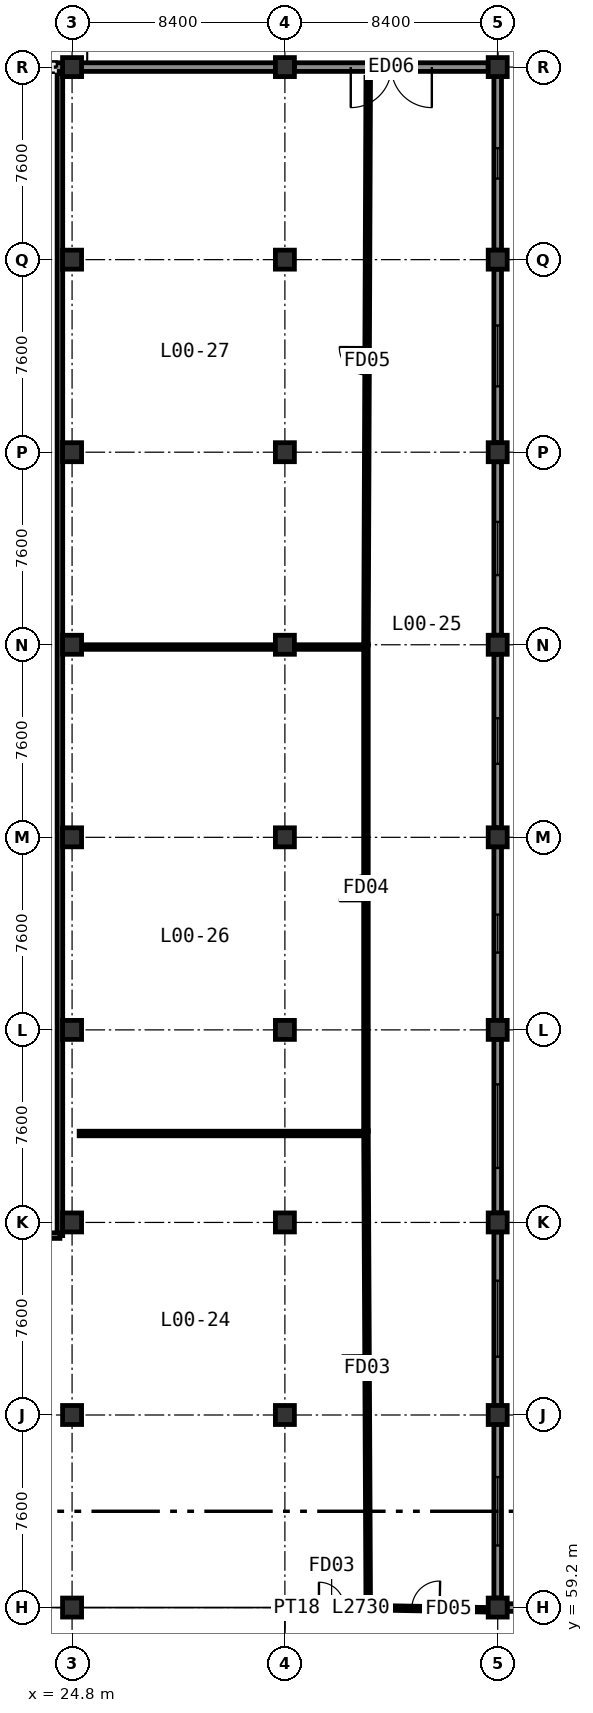
"""IFC4 building model, lengths in metres.
Left out: names, types, materials, properties, quantities, classifications, styles, units other than length and angle.
Written with IfcOpenShell. Run it as: python <this file> out.ifc"""

import sys

from ifc_helpers import new_model, si_unit, direction, frame, frame_2d, origin, origin_2d, place, context, subcontext, project, spatial, rectangle, extrude, element, fill, save


model = new_model("IFC4")
c1 = context("Model", 3, precision=1e-05, world=origin(), true_north=direction((0.0, 1.0)))
c2 = subcontext(c1, "Body", "Model", "MODEL_VIEW")
j1 = project(units=[si_unit("LENGTHUNIT", "METRE"), si_unit("PLANEANGLEUNIT", "RADIAN")], contexts=[c1])
p1 = place(None, origin())
s1 = spatial("IfcSite", under=j1, at=p1, CompositionType="ELEMENT")
p2 = place(p1, origin())
s2 = spatial("IfcBuilding", under=s1, at=p2, CompositionType="ELEMENT")
p3 = place(p2, origin())
s3 = spatial("IfcBuildingStorey", under=s2, at=p3, CompositionType="ELEMENT", Elevation=0.0)
for number, where, z_axis, x_axis in (
    (1, (24.8, 59.2, 0.0), (0.0, 0.0, 1.0), (1.0, 0.0, 0.0)),
    (2, (33.2, 59.2, 0.0), (0.0, 0.0, 1.0), (1.0, 0.0, 0.0)),
    (3, (41.6, 59.2, 0.0), (0.0, 0.0, 1.0), (1.0, 0.0, 0.0)),
    (4, (24.8, 66.8, 0.0), (0.0, 0.0, 1.0), (1.0, 0.0, 0.0)),
    (5, (33.2, 66.8, 0.0), (0.0, 0.0, 1.0), (1.0, 0.0, 0.0)),
    (6, (41.6, 66.8, 0.0), (0.0, 0.0, 1.0), (1.0, 0.0, 0.0)),
    (7, (24.8, 74.4, 0.0), (0.0, 0.0, 1.0), (1.0, 0.0, 0.0)),
    (8, (33.2, 74.4, 0.0), (0.0, 0.0, 1.0), (1.0, 0.0, 0.0)),
    (9, (41.6, 74.4, 0.0), (0.0, 0.0, 1.0), (1.0, 0.0, 0.0)),
    (10, (24.8, 82.0, 0.0), (0.0, 0.0, 1.0), (1.0, 0.0, 0.0)),
    (11, (33.2, 82.0, 0.0), (0.0, 0.0, 1.0), (1.0, 0.0, 0.0)),
    (12, (41.6, 82.0, 0.0), (0.0, 0.0, 1.0), (1.0, 0.0, 0.0)),
    (13, (24.8, 89.6, 0.0), (0.0, 0.0, 1.0), (1.0, 0.0, 0.0)),
    (14, (33.2, 89.6, 0.0), (0.0, 0.0, 1.0), (1.0, 0.0, 0.0)),
    (15, (41.6, 89.6, 0.0), (0.0, 0.0, 1.0), (1.0, 0.0, 0.0)),
    (16, (24.8, 97.2, 0.0), (0.0, 0.0, 1.0), (1.0, 0.0, 0.0)),
    (17, (33.2, 97.2, 0.0), (0.0, 0.0, 1.0), (1.0, 0.0, 0.0)),
    (18, (41.6, 97.2, 0.0), (0.0, 0.0, 1.0), (1.0, 0.0, 0.0)),
    (19, (24.8, 104.8, 0.0), (0.0, 0.0, 1.0), (1.0, 0.0, 0.0)),
    (20, (33.2, 104.8, 0.0), (0.0, 0.0, 1.0), (1.0, 0.0, 0.0)),
    (21, (41.6, 104.8, 0.0), (0.0, 0.0, 1.0), (1.0, 0.0, 0.0)),
    (22, (24.8, 112.4, 0.0), (0.0, 0.0, 1.0), (1.0, 0.0, 0.0)),
    (23, (33.2, 112.4, 0.0), (0.0, 0.0, 1.0), (1.0, 0.0, 0.0)),
    (24, (41.6, 112.4, 0.0), (0.0, 0.0, 1.0), (1.0, 0.0, 0.0)),
    (25, (24.8, 120.0, 0.0), (0.0, 0.0, 1.0), (1.0, 0.0, 0.0)),
    (26, (33.2, 120.0, 0.0), (0.0, 0.0, 1.0), (1.0, 0.0, 0.0)),
    (27, (41.6, 120.0, 0.0), (0.0, 0.0, 1.0), (1.0, 0.0, 0.0)),
):
    element("IfcColumn", number, at=place(p3, frame(where, z_axis=z_axis, x_axis=x_axis)), inside=s3, PredefinedType="COLUMN", context=c2, shape_type="SweptSolid", body=[
        extrude(rectangle(XDim=0.75, YDim=0.75, at=origin_2d()), origin(), (0.0, 0.0, 1.0), 4.8),
    ])
p4 = place(p3, frame((49.625, 59.2, 0.0), z_axis=(0.0, 0.0, 1.0), x_axis=(-1.0, 0.0, 0.0)))
e28 = element("IfcWall", 28, at=p4, inside=s3, PredefinedType="SOLIDWALL", context=c2, shape_type="SweptSolid", body=[
    extrude(rectangle(XDim=7.65, YDim=0.3, at=frame_2d((3.825, 0.0))), origin(), (0.0, 0.0, 1.0), 4.5),
])
p5 = place(p4, frame((2.625, 0.0, 0.95)))
e29 = element("IfcOpeningElement", 29, at=p5, cuts=e28, PredefinedType="OPENING", context=c2, shape_type="SweptSolid", body=[
    extrude(rectangle(XDim=2.4, YDim=2.1, at=frame_2d((1.2, 1.05))), frame((0.0, 0.16, 0.0), z_axis=(0.0, -1.0, 0.0), x_axis=(1.0, 0.0, 0.0)), (0.0, 0.0, 1.0), 0.32),
])
p6 = place(p3, frame((41.6, 59.575, 0.0), z_axis=(0.0, 0.0, 1.0), x_axis=(0.0, 1.0, 0.0)))
e30 = element("IfcWall", 30, at=p6, inside=s3, PredefinedType="SOLIDWALL", context=c2, shape_type="SweptSolid", body=[
    extrude(rectangle(XDim=6.85, YDim=0.3, at=frame_2d((3.425, 0.0))), origin(), (0.0, 0.0, 1.0), 4.5),
])
p7 = place(p6, frame((2.075, 0.0, 0.95)))
e31 = element("IfcOpeningElement", 31, at=p7, cuts=e30, PredefinedType="OPENING", context=c2, shape_type="SweptSolid", body=[
    extrude(rectangle(XDim=2.7, YDim=2.1, at=frame_2d((1.35, 1.05))), frame((0.0, 0.16, 0.0), z_axis=(0.0, -1.0, 0.0), x_axis=(1.0, 0.0, 0.0)), (0.0, 0.0, 1.0), 0.32),
])
p8 = place(p3, frame((41.6, 67.175, 0.0), z_axis=(0.0, 0.0, 1.0), x_axis=(0.0, 1.0, 0.0)))
e32 = element("IfcWall", 32, at=p8, inside=s3, PredefinedType="SOLIDWALL", context=c2, shape_type="SweptSolid", body=[
    extrude(rectangle(XDim=6.85, YDim=0.3, at=frame_2d((3.425, 0.0))), origin(), (0.0, 0.0, 1.0), 4.5),
])
p9 = place(p8, frame((1.925, 0.0, 0.95)))
e33 = element("IfcOpeningElement", 33, at=p9, cuts=e32, PredefinedType="OPENING", context=c2, shape_type="SweptSolid", body=[
    extrude(rectangle(XDim=3.0, YDim=2.1, at=frame_2d((1.5, 1.05))), frame((0.0, 0.16, 0.0), z_axis=(0.0, -1.0, 0.0), x_axis=(1.0, 0.0, 0.0)), (0.0, 0.0, 1.0), 0.32),
])
p10 = place(p3, frame((41.6, 74.775, 0.0), z_axis=(0.0, 0.0, 1.0), x_axis=(0.0, 1.0, 0.0)))
e34 = element("IfcWall", 34, at=p10, inside=s3, PredefinedType="SOLIDWALL", context=c2, shape_type="SweptSolid", body=[
    extrude(rectangle(XDim=6.85, YDim=0.3, at=frame_2d((3.425, 0.0))), origin(), (0.0, 0.0, 1.0), 4.5),
])
p11 = place(p10, frame((1.775, 0.0, 0.95)))
e35 = element("IfcOpeningElement", 35, at=p11, cuts=e34, PredefinedType="OPENING", context=c2, shape_type="SweptSolid", body=[
    extrude(rectangle(XDim=3.3, YDim=2.1, at=frame_2d((1.65, 1.05))), frame((0.0, 0.16, 0.0), z_axis=(0.0, -1.0, 0.0), x_axis=(1.0, 0.0, 0.0)), (0.0, 0.0, 1.0), 0.32),
])
p12 = place(p3, frame((41.6, 82.375, 0.0), z_axis=(0.0, 0.0, 1.0), x_axis=(0.0, 1.0, 0.0)))
e36 = element("IfcWall", 36, at=p12, inside=s3, PredefinedType="SOLIDWALL", context=c2, shape_type="SweptSolid", body=[
    extrude(rectangle(XDim=6.85, YDim=0.3, at=frame_2d((3.425, 0.0))), origin(), (0.0, 0.0, 1.0), 4.5),
])
p13 = place(p12, frame((2.675, 0.0, 0.95)))
e37 = element("IfcOpeningElement", 37, at=p13, cuts=e36, PredefinedType="OPENING", context=c2, shape_type="SweptSolid", body=[
    extrude(rectangle(XDim=1.5, YDim=1.2, at=frame_2d((0.75, 0.6))), frame((0.0, 0.16, 0.0), z_axis=(0.0, -1.0, 0.0), x_axis=(1.0, 0.0, 0.0)), (0.0, 0.0, 1.0), 0.32),
])
p14 = place(p3, frame((41.6, 89.975, 0.0), z_axis=(0.0, 0.0, 1.0), x_axis=(0.0, 1.0, 0.0)))
e38 = element("IfcWall", 38, at=p14, inside=s3, PredefinedType="SOLIDWALL", context=c2, shape_type="SweptSolid", body=[
    extrude(rectangle(XDim=6.85, YDim=0.3, at=frame_2d((3.425, 0.0))), origin(), (0.0, 0.0, 1.0), 3.95),
])
p15 = place(p14, frame((2.525, 0.0, 0.95)))
e39 = element("IfcOpeningElement", 39, at=p15, cuts=e38, PredefinedType="OPENING", context=c2, shape_type="SweptSolid", body=[
    extrude(rectangle(XDim=1.8, YDim=1.2, at=frame_2d((0.9, 0.6))), frame((0.0, 0.16, 0.0), z_axis=(0.0, -1.0, 0.0), x_axis=(1.0, 0.0, 0.0)), (0.0, 0.0, 1.0), 0.32),
])
p16 = place(p3, frame((41.6, 97.575, 0.0), z_axis=(0.0, 0.0, 1.0), x_axis=(0.0, 1.0, 0.0)))
e40 = element("IfcWall", 40, at=p16, inside=s3, PredefinedType="SOLIDWALL", context=c2, shape_type="SweptSolid", body=[
    extrude(rectangle(XDim=6.85, YDim=0.3, at=frame_2d((3.425, 0.0))), origin(), (0.0, 0.0, 1.0), 3.95),
])
p17 = place(p16, frame((2.375, 0.0, 0.95)))
e41 = element("IfcOpeningElement", 41, at=p17, cuts=e40, PredefinedType="OPENING", context=c2, shape_type="SweptSolid", body=[
    extrude(rectangle(XDim=2.1, YDim=1.2, at=frame_2d((1.05, 0.6))), frame((0.0, 0.16, 0.0), z_axis=(0.0, -1.0, 0.0), x_axis=(1.0, 0.0, 0.0)), (0.0, 0.0, 1.0), 0.32),
])
p18 = place(p3, frame((41.6, 105.175, 0.0), z_axis=(0.0, 0.0, 1.0), x_axis=(0.0, 1.0, 0.0)))
e42 = element("IfcWall", 42, at=p18, inside=s3, PredefinedType="SOLIDWALL", context=c2, shape_type="SweptSolid", body=[
    extrude(rectangle(XDim=6.85, YDim=0.3, at=frame_2d((3.425, 0.0))), origin(), (0.0, 0.0, 1.0), 3.95),
])
p19 = place(p18, frame((2.225, 0.0, 0.95)))
e43 = element("IfcOpeningElement", 43, at=p19, cuts=e42, PredefinedType="OPENING", context=c2, shape_type="SweptSolid", body=[
    extrude(rectangle(XDim=2.4, YDim=1.2, at=frame_2d((1.2, 0.6))), frame((0.0, 0.16, 0.0), z_axis=(0.0, -1.0, 0.0), x_axis=(1.0, 0.0, 0.0)), (0.0, 0.0, 1.0), 0.32),
])
p20 = place(p3, frame((41.6, 112.775, 0.0), z_axis=(0.0, 0.0, 1.0), x_axis=(0.0, 1.0, 0.0)))
e44 = element("IfcWall", 44, at=p20, inside=s3, PredefinedType="SOLIDWALL", context=c2, shape_type="SweptSolid", body=[
    extrude(rectangle(XDim=6.85, YDim=0.3, at=frame_2d((3.425, 0.0))), origin(), (0.0, 0.0, 1.0), 3.95),
])
p21 = place(p20, frame((2.825, 0.0, 0.95)))
e45 = element("IfcOpeningElement", 45, at=p21, cuts=e44, PredefinedType="OPENING", context=c2, shape_type="SweptSolid", body=[
    extrude(rectangle(XDim=1.2, YDim=1.5, at=frame_2d((0.6, 0.75))), frame((0.0, 0.16, 0.0), z_axis=(0.0, -1.0, 0.0), x_axis=(1.0, 0.0, 0.0)), (0.0, 0.0, 1.0), 0.32),
])
p22 = place(p3, frame((41.225, 120.0, 0.0), z_axis=(0.0, 0.0, 1.0), x_axis=(-1.0, 0.0, 0.0)))
e46 = element("IfcWall", 46, at=p22, inside=s3, PredefinedType="SOLIDWALL", context=c2, shape_type="SweptSolid", body=[
    extrude(rectangle(XDim=7.65, YDim=0.34, at=frame_2d((3.825, 0.0))), origin(), (0.0, 0.0, 1.0), 4.187),
])
p23 = place(p22, frame((2.225, 0.0, 0.0)))
e47 = element("IfcOpeningElement", 47, at=p23, cuts=e46, PredefinedType="OPENING", context=c2, shape_type="SweptSolid", body=[
    extrude(rectangle(XDim=3.2, YDim=3.0, at=frame_2d((1.6, 1.5))), frame((0.0, 0.18, 0.0), z_axis=(0.0, -1.0, 0.0), x_axis=(1.0, 0.0, 0.0)), (0.0, 0.0, 1.0), 0.36),
])
p24 = place(p3, frame((16.775, 120.0, 0.0), z_axis=(0.0, 0.0, 1.0), x_axis=(1.0, 0.0, 0.0)))
e48 = element("IfcWall", 48, at=p24, inside=s3, PredefinedType="SOLIDWALL", context=c2, shape_type="SweptSolid", body=[
    extrude(rectangle(XDim=16.05, YDim=0.34, at=frame_2d((8.025, 0.0))), origin(), (0.0, 0.0, 1.0), 4.187),
])
p25 = place(p24, frame((0.825, 0.0, 0.0)))
e49 = element("IfcOpeningElement", 49, at=p25, cuts=e48, PredefinedType="OPENING", context=c2, shape_type="SweptSolid", body=[
    extrude(rectangle(XDim=6.6, YDim=3.0, at=frame_2d((3.3, 1.5))), frame((0.0, 0.18, 0.0), z_axis=(0.0, -1.0, 0.0), x_axis=(1.0, 0.0, 0.0)), (0.0, 0.0, 1.0), 0.36),
])
p26 = place(p3, frame((24.32, 73.88, 0.0), z_axis=(0.0, 0.0, 1.0), x_axis=(0.0, 1.0, 0.0)))
e50 = element("IfcWall", 50, at=p26, inside=s3, PredefinedType="SOLIDWALL", context=c2, shape_type="SweptSolid", body=[
    extrude(rectangle(XDim=45.87, YDim=0.22, at=frame_2d((22.935, 0.0))), origin(), (0.0, 0.0, 1.0), 4.5),
])
p27 = place(p3, frame((17.48, 73.88, 0.0), z_axis=(0.0, 0.0, 1.0), x_axis=(1.0, 0.0, 0.0)))
e51 = element("IfcWall", 51, at=p27, inside=s3, PredefinedType="SOLIDWALL", context=c2, shape_type="SweptSolid", body=[
    extrude(rectangle(XDim=6.84, YDim=0.22, at=frame_2d((3.42, 0.0))), origin(), (0.0, 0.0, 1.0), 4.5),
])
p28 = place(p3, frame((33.68, 59.2, 0.0), z_axis=(0.0, 0.0, 1.0), x_axis=(1.0, 0.0, 0.0)))
e52 = element("IfcWall", 52, at=p28, inside=s3, PredefinedType="PARTITIONING", context=c2, shape_type="SweptSolid", body=[
    extrude(rectangle(XDim=2.729, YDim=0.18, at=frame_2d((1.365, 0.0))), origin(), (0.0, 0.0, 1.0), 4.5),
])
p29 = place(p28, frame((0.865, 0.0, 0.0)))
e53 = element("IfcOpeningElement", 53, at=p29, cuts=e52, PredefinedType="OPENING", context=c2, shape_type="SweptSolid", body=[
    extrude(rectangle(XDim=1.0, YDim=2.1, at=frame_2d((0.5, 1.05))), frame((0.0, 0.1, 0.0), z_axis=(0.0, -1.0, 0.0), x_axis=(1.0, 0.0, 0.0)), (0.0, 0.0, 1.0), 0.2),
])
p30 = place(p3, frame((36.49, 59.29, 0.0), z_axis=(0.0, 0.0, 1.0), x_axis=(-0.004757754169, 0.999988681824, 0.0)))
e54 = element("IfcWall", 54, at=p30, inside=s3, PredefinedType="PARTITIONING", context=c2, shape_type="SweptSolid", body=[
    extrude(rectangle(XDim=18.73, YDim=0.18, at=frame_2d((9.365, 0.0))), origin(), (0.0, 0.0, 1.0), 4.5),
])
p31 = place(p30, frame((8.865, 0.0, 0.0)))
e55 = element("IfcOpeningElement", 55, at=p31, cuts=e54, PredefinedType="OPENING", context=c2, shape_type="SweptSolid", body=[
    extrude(rectangle(XDim=1.0, YDim=2.1, at=frame_2d((0.5, 1.05))), frame((0.0, 0.1, 0.0), z_axis=(0.0, -1.0, 0.0), x_axis=(1.0, 0.0, 0.0)), (0.0, 0.0, 1.0), 0.2),
])
p32 = place(p3, frame((36.4, 77.99, 0.0), z_axis=(0.0, 0.0, 1.0), x_axis=(0.0, 1.0, 0.0)))
e56 = element("IfcWall", 56, at=p32, inside=s3, PredefinedType="PARTITIONING", context=c2, shape_type="SweptSolid", body=[
    extrude(rectangle(XDim=19.229, YDim=0.18, at=frame_2d((9.615, 0.0))), origin(), (0.0, 0.0, 1.0), 4.5),
])
p33 = place(p32, frame((9.09, 0.0, 0.0)))
e57 = element("IfcOpeningElement", 57, at=p33, cuts=e56, PredefinedType="OPENING", context=c2, shape_type="SweptSolid", body=[
    extrude(rectangle(XDim=1.05, YDim=2.1, at=frame_2d((0.525, 1.05))), frame((0.0, 0.1, 0.0), z_axis=(0.0, -1.0, 0.0), x_axis=(1.0, 0.0, 0.0)), (0.0, 0.0, 1.0), 0.2),
])
p34 = place(p3, frame((36.4, 97.19, 0.0), z_axis=(0.0, 0.0, 1.0), x_axis=(0.003998224933, 0.999992007067, 0.0)))
e58 = element("IfcWall", 58, at=p34, inside=s3, PredefinedType="PARTITIONING", context=c2, shape_type="SweptSolid", body=[
    extrude(rectangle(XDim=22.41, YDim=0.18, at=frame_2d((11.205, 0.0))), origin(), (0.0, 0.0, 1.0), 4.5),
])
p35 = place(p34, frame((10.655, 0.0, 0.0)))
e59 = element("IfcOpeningElement", 59, at=p35, cuts=e58, PredefinedType="OPENING", context=c2, shape_type="SweptSolid", body=[
    extrude(rectangle(XDim=1.1, YDim=2.1, at=frame_2d((0.55, 1.05))), frame((0.0, 0.1, 0.0), z_axis=(0.0, -1.0, 0.0), x_axis=(1.0, 0.0, 0.0)), (0.0, 0.0, 1.0), 0.2),
])
p36 = place(p3, frame((36.381, 59.198, 0.0), z_axis=(0.0, 0.0, 1.0), x_axis=(0.9998376067, -0.018021105061, 0.0)))
e60 = element("IfcWall", 60, at=p36, inside=s3, PredefinedType="PARTITIONING", context=c2, shape_type="SweptSolid", body=[
    extrude(rectangle(XDim=4.755, YDim=0.18, at=frame_2d((2.377, 0.0))), origin(), (0.0, 0.0, 1.0), 4.5),
])
p37 = place(p36, frame((1.828, 0.0, 0.0)))
e61 = element("IfcOpeningElement", 61, at=p37, cuts=e60, PredefinedType="OPENING", context=c2, shape_type="SweptSolid", body=[
    extrude(rectangle(XDim=1.1, YDim=2.1, at=frame_2d((0.55, 1.05))), frame((0.0, 0.1, 0.0), z_axis=(0.0, -1.0, 0.0), x_axis=(1.0, 0.0, 0.0)), (0.0, 0.0, 1.0), 0.2),
])
p38 = place(p3, frame((25.08, 77.91, 0.0), z_axis=(0.0, 0.0, 1.0), x_axis=(1.0, 0.0, 0.0)))
e62 = element("IfcWall", 62, at=p38, inside=s3, PredefinedType="PARTITIONING", context=c2, shape_type="SweptSolid", body=[
    extrude(rectangle(XDim=11.23, YDim=0.18, at=frame_2d((5.615, 0.0))), origin(), (0.0, 0.0, 1.0), 4.5),
])
p39 = place(p3, frame((25.265, 97.11, 0.0), z_axis=(0.0, 0.0, 1.0), x_axis=(1.0, 0.0, 0.0)))
e63 = element("IfcWall", 63, at=p39, inside=s3, PredefinedType="PARTITIONING", context=c2, shape_type="SweptSolid", body=[
    extrude(rectangle(XDim=7.47, YDim=0.18, at=frame_2d((3.735, 0.0))), origin(), (0.0, 0.0, 1.0), 3.95),
])
p40 = place(p3, frame((33.665, 97.11, 0.0), z_axis=(0.0, 0.0, 1.0), x_axis=(1.0, 0.0, 0.0)))
e64 = element("IfcWall", 64, at=p40, inside=s3, PredefinedType="PARTITIONING", context=c2, shape_type="SweptSolid", body=[
    extrude(rectangle(XDim=2.645, YDim=0.18, at=frame_2d((1.323, 0.0))), origin(), (0.0, 0.0, 1.0), 3.95),
])
p41 = place(p7, origin())
e65 = element("IfcWindow", 65, at=p41, inside=s3, PartitioningType="DOUBLE_PANEL_VERTICAL", PredefinedType="WINDOW", context=c2, shape_type="SweptSolid", body=[
    extrude(rectangle(XDim=2.7, YDim=2.1, at=frame_2d((1.35, 1.05))), frame((0.0, 0.03, 0.0), z_axis=(0.0, -1.0, 0.0), x_axis=(1.0, 0.0, 0.0)), (0.0, 0.0, 1.0), 0.06),
])
fill(e31, e65)
p42 = place(p9, origin())
e66 = element("IfcWindow", 66, at=p42, inside=s3, PartitioningType="DOUBLE_PANEL_VERTICAL", PredefinedType="WINDOW", context=c2, shape_type="SweptSolid", body=[
    extrude(rectangle(XDim=3.0, YDim=2.1, at=frame_2d((1.5, 1.05))), frame((0.0, 0.03, 0.0), z_axis=(0.0, -1.0, 0.0), x_axis=(1.0, 0.0, 0.0)), (0.0, 0.0, 1.0), 0.06),
])
fill(e33, e66)
p43 = place(p11, origin())
e67 = element("IfcWindow", 67, at=p43, inside=s3, PartitioningType="DOUBLE_PANEL_VERTICAL", PredefinedType="WINDOW", context=c2, shape_type="SweptSolid", body=[
    extrude(rectangle(XDim=3.3, YDim=2.1, at=frame_2d((1.65, 1.05))), frame((0.0, 0.03, 0.0), z_axis=(0.0, -1.0, 0.0), x_axis=(1.0, 0.0, 0.0)), (0.0, 0.0, 1.0), 0.06),
])
fill(e35, e67)
p44 = place(p13, origin())
e68 = element("IfcWindow", 68, at=p44, inside=s3, PartitioningType="SINGLE_PANEL", PredefinedType="WINDOW", context=c2, shape_type="SweptSolid", body=[
    extrude(rectangle(XDim=1.5, YDim=1.2, at=frame_2d((0.75, 0.6))), frame((0.0, 0.03, 0.0), z_axis=(0.0, -1.0, 0.0), x_axis=(1.0, 0.0, 0.0)), (0.0, 0.0, 1.0), 0.06),
])
fill(e37, e68)
p45 = place(p15, origin())
e69 = element("IfcWindow", 69, at=p45, inside=s3, PartitioningType="DOUBLE_PANEL_VERTICAL", PredefinedType="WINDOW", context=c2, shape_type="SweptSolid", body=[
    extrude(rectangle(XDim=1.8, YDim=1.2, at=frame_2d((0.9, 0.6))), frame((0.0, 0.03, 0.0), z_axis=(0.0, -1.0, 0.0), x_axis=(1.0, 0.0, 0.0)), (0.0, 0.0, 1.0), 0.06),
])
fill(e39, e69)
p46 = place(p17, origin())
e70 = element("IfcWindow", 70, at=p46, inside=s3, PartitioningType="DOUBLE_PANEL_VERTICAL", PredefinedType="WINDOW", context=c2, shape_type="SweptSolid", body=[
    extrude(rectangle(XDim=2.1, YDim=1.2, at=frame_2d((1.05, 0.6))), frame((0.0, 0.03, 0.0), z_axis=(0.0, -1.0, 0.0), x_axis=(1.0, 0.0, 0.0)), (0.0, 0.0, 1.0), 0.06),
])
fill(e41, e70)
p47 = place(p19, origin())
e71 = element("IfcWindow", 71, at=p47, inside=s3, PartitioningType="DOUBLE_PANEL_VERTICAL", PredefinedType="WINDOW", context=c2, shape_type="SweptSolid", body=[
    extrude(rectangle(XDim=2.4, YDim=1.2, at=frame_2d((1.2, 0.6))), frame((0.0, 0.03, 0.0), z_axis=(0.0, -1.0, 0.0), x_axis=(1.0, 0.0, 0.0)), (0.0, 0.0, 1.0), 0.06),
])
fill(e43, e71)
p48 = place(p21, origin())
e72 = element("IfcWindow", 72, at=p48, inside=s3, PartitioningType="SINGLE_PANEL", PredefinedType="WINDOW", context=c2, shape_type="SweptSolid", body=[
    extrude(rectangle(XDim=1.2, YDim=1.5, at=frame_2d((0.6, 0.75))), frame((0.0, 0.03, 0.0), z_axis=(0.0, -1.0, 0.0), x_axis=(1.0, 0.0, 0.0)), (0.0, 0.0, 1.0), 0.06),
])
fill(e45, e72)
p49 = place(p23, frame((3.2, 0.0, 0.0), z_axis=(0.0, 0.0, 1.0), x_axis=(-1.0, 0.0, 0.0)))
e73 = element("IfcDoor", 73, at=p49, inside=s3, OperationType="DOUBLE_DOOR_SINGLE_SWING", PredefinedType="DOOR", context=c2, shape_type="SweptSolid", body=[
    extrude(rectangle(XDim=3.2, YDim=3.0, at=frame_2d((1.6, 1.5))), frame((0.0, 0.025, 0.0), z_axis=(0.0, -1.0, 0.0), x_axis=(1.0, 0.0, 0.0)), (0.0, 0.0, 1.0), 0.05),
])
fill(e47, e73)
p50 = place(p25, origin())
e74 = element("IfcDoor", 74, at=p50, inside=s3, OperationType="ROLLINGUP", PredefinedType="DOOR", context=c2, shape_type="SweptSolid", body=[
    extrude(rectangle(XDim=6.6, YDim=3.0, at=frame_2d((3.3, 1.5))), frame((0.0, 0.025, 0.0), z_axis=(0.0, -1.0, 0.0), x_axis=(1.0, 0.0, 0.0)), (0.0, 0.0, 1.0), 0.05),
])
fill(e49, e74)
p51 = place(p29, origin())
e75 = element("IfcDoor", 75, at=p51, inside=s3, OperationType="SINGLE_SWING_LEFT", PredefinedType="DOOR", context=c2, shape_type="SweptSolid", body=[
    extrude(rectangle(XDim=1.0, YDim=2.1, at=frame_2d((0.5, 1.05))), frame((0.0, 0.025, 0.0), z_axis=(0.0, -1.0, 0.0), x_axis=(1.0, 0.0, 0.0)), (0.0, 0.0, 1.0), 0.05),
])
fill(e53, e75)
p52 = place(p31, origin())
e76 = element("IfcDoor", 76, at=p52, inside=s3, OperationType="SINGLE_SWING_RIGHT", PredefinedType="DOOR", context=c2, shape_type="SweptSolid", body=[
    extrude(rectangle(XDim=1.0, YDim=2.1, at=frame_2d((0.5, 1.05))), frame((0.0, 0.025, 0.0), z_axis=(0.0, -1.0, 0.0), x_axis=(1.0, 0.0, 0.0)), (0.0, 0.0, 1.0), 0.05),
])
fill(e55, e76)
p53 = place(p33, origin())
e77 = element("IfcDoor", 77, at=p53, inside=s3, OperationType="SINGLE_SWING_LEFT", PredefinedType="DOOR", context=c2, shape_type="SweptSolid", body=[
    extrude(rectangle(XDim=1.05, YDim=2.1, at=frame_2d((0.525, 1.05))), frame((0.0, 0.025, 0.0), z_axis=(0.0, -1.0, 0.0), x_axis=(1.0, 0.0, 0.0)), (0.0, 0.0, 1.0), 0.05),
])
fill(e57, e77)
p54 = place(p35, origin())
e78 = element("IfcDoor", 78, at=p54, inside=s3, OperationType="SINGLE_SWING_RIGHT", PredefinedType="DOOR", context=c2, shape_type="SweptSolid", body=[
    extrude(rectangle(XDim=1.1, YDim=2.1, at=frame_2d((0.55, 1.05))), frame((0.0, 0.025, 0.0), z_axis=(0.0, -1.0, 0.0), x_axis=(1.0, 0.0, 0.0)), (0.0, 0.0, 1.0), 0.05),
])
fill(e59, e78)
p55 = place(p37, origin())
e79 = element("IfcDoor", 79, at=p55, inside=s3, OperationType="SINGLE_SWING_RIGHT", PredefinedType="DOOR", context=c2, shape_type="SweptSolid", body=[
    extrude(rectangle(XDim=1.1, YDim=2.1, at=frame_2d((0.55, 1.05))), frame((0.0, 0.025, 0.0), z_axis=(0.0, -1.0, 0.0), x_axis=(1.0, 0.0, 0.0)), (0.0, 0.0, 1.0), 0.05),
])
fill(e61, e79)
save(model, sys.argv[1])
